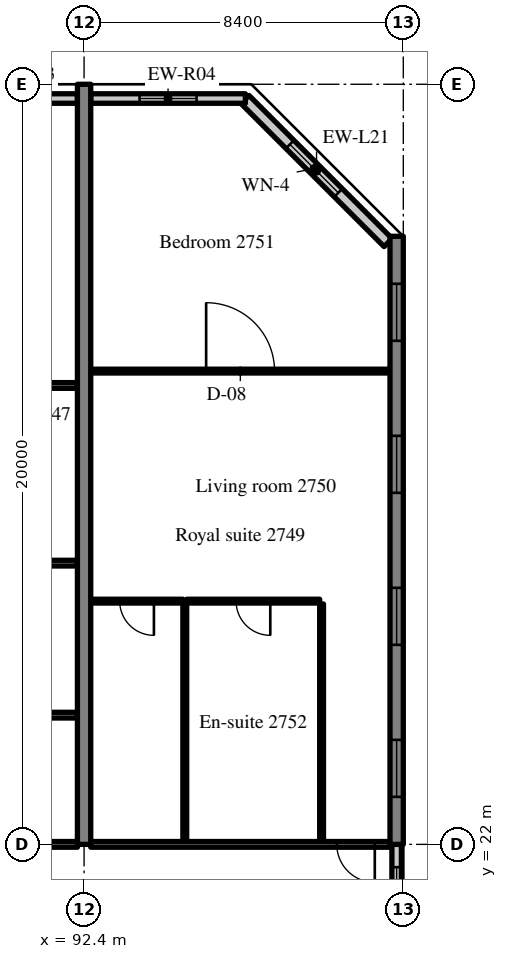
"""IFC4 building model, lengths in metres.
Left out: names, types, materials, properties, quantities, classifications, styles, units other than length and angle.
Written with IfcOpenShell. Run it as: python <this file> out.ifc"""

import sys

from ifc_helpers import new_model, si_unit, direction, frame, frame_2d, origin, place, context, subcontext, project, spatial, rectangle, extrude, source, transform, mapped, element, fill, save


model = new_model("IFC4")
c1 = context("Model", 3, precision=1e-05, world=origin(), true_north=direction((0.0, 1.0)))
c2 = subcontext(c1, "Body", "Model", "MODEL_VIEW")
j1 = project(units=[si_unit("LENGTHUNIT", "METRE"), si_unit("PLANEANGLEUNIT", "RADIAN")], contexts=[c1])
p1 = place(None, origin())
s1 = spatial("IfcSite", under=j1, at=p1, CompositionType="ELEMENT")
p2 = place(p1, origin())
s2 = spatial("IfcBuilding", under=s1, at=p2, CompositionType="ELEMENT")
p3 = place(p2, frame((0.0, 0.0, 114.2)))
s3 = spatial("IfcBuildingStorey", under=s2, at=p3, CompositionType="ELEMENT", Elevation=114.2)
m1 = source(origin(), c2, "Body", "SweptSolid", [
    extrude(rectangle(XDim=20.0, YDim=0.35, at=frame_2d((10.0, 0.0))), origin(), (0.0, 0.0, 1.0), 3.52),
])
p4 = place(p3, frame((92.4, 22.0, 0.0), z_axis=(0.0, 0.0, 1.0), x_axis=(0.0, 1.0, 0.0)))
e1 = element("IfcWall", 1, at=p4, inside=s3, PredefinedType="SHEAR", context=c2, shape_type="MappedRepresentation", body=[
    mapped(m1, transform((0.0, 0.0, 0.0), scale=1.0)),
])
m2 = source(origin(), c2, "Body", "SweptSolid", [
    extrude(rectangle(XDim=16.0, YDim=0.35, at=frame_2d((8.0, 0.0))), origin(), (0.0, 0.0, 1.0), 3.52),
])
p5 = place(p3, frame((100.625, 22.0, 0.0), z_axis=(0.0, 0.0, 1.0), x_axis=(0.0, 1.0, 0.0)))
e2 = element("IfcWall", 2, at=p5, inside=s3, PredefinedType="SHEAR", context=c2, shape_type="MappedRepresentation", body=[
    mapped(m2, transform((0.0, 0.0, 0.0), scale=1.0)),
])
m3 = source(origin(), c2, "Body", "SweptSolid", [
    extrude(rectangle(XDim=1.5, YDim=1.5, at=frame_2d((0.75, 0.75))), frame((0.0, 0.185, 0.0), z_axis=(0.0, -1.0, 0.0), x_axis=(1.0, 0.0, 0.0)), (0.0, 0.0, 1.0), 0.37),
])
p6 = place(p5, frame((1.25, 0.0, 0.9)))
e3 = element("IfcOpeningElement", 3, at=p6, cuts=e2, PredefinedType="OPENING", context=c2, shape_type="MappedRepresentation", body=[
    mapped(m3, transform((0.0, 0.0, 0.0), scale=1.0)),
])
p7 = place(p5, frame((5.25, 0.0, 0.9)))
e4 = element("IfcOpeningElement", 4, at=p7, cuts=e2, PredefinedType="OPENING", context=c2, shape_type="MappedRepresentation", body=[
    mapped(m3, transform((0.0, 0.0, 0.0), scale=1.0)),
])
p8 = place(p5, frame((9.25, 0.0, 0.9)))
e5 = element("IfcOpeningElement", 5, at=p8, cuts=e2, PredefinedType="OPENING", context=c2, shape_type="MappedRepresentation", body=[
    mapped(m3, transform((0.0, 0.0, 0.0), scale=1.0)),
])
p9 = place(p5, frame((13.25, 0.0, 0.9)))
e6 = element("IfcOpeningElement", 6, at=p9, cuts=e2, PredefinedType="OPENING", context=c2, shape_type="MappedRepresentation", body=[
    mapped(m3, transform((0.0, 0.0, 0.0), scale=1.0)),
])
m4 = source(origin(), c2, "Body", "SweptSolid", [
    extrude(rectangle(XDim=5.326, YDim=0.3, at=frame_2d((2.663, 0.0))), origin(), (0.0, 0.0, 1.0), 3.52),
])
p10 = place(p3, frame((100.4, 37.834, 0.0), z_axis=(0.0, 0.0, 1.0), x_axis=(-0.707083859269, 0.707129702361, 0.0)))
e7 = element("IfcWall", 7, at=p10, inside=s3, PredefinedType="SOLIDWALL", context=c2, shape_type="MappedRepresentation", body=[
    mapped(m4, transform((0.0, 0.0, 0.0), scale=1.0)),
])
m5 = source(origin(), c2, "Body", "SweptSolid", [
    extrude(rectangle(XDim=1.8, YDim=1.5, at=frame_2d((0.9, 0.75))), frame((0.0, 0.16, 0.0), z_axis=(0.0, -1.0, 0.0), x_axis=(1.0, 0.0, 0.0)), (0.0, 0.0, 1.0), 0.32),
])
p11 = place(p10, frame((1.854, 0.0, 0.9)))
e8 = element("IfcOpeningElement", 8, at=p11, cuts=e7, PredefinedType="OPENING", context=c2, shape_type="MappedRepresentation", body=[
    mapped(m5, transform((0.0, 0.0, 0.0), scale=1.0)),
])
m6 = source(origin(), c2, "Body", "SweptSolid", [
    extrude(rectangle(XDim=3.675, YDim=0.25, at=frame_2d((1.837, 0.0))), origin(), (0.0, 0.0, 1.0), 2.82),
])
p12 = place(p3, frame((92.225, 41.625, 0.0), z_axis=(0.0, 0.0, 1.0), x_axis=(-1.0, 0.0, 0.0)))
e9 = element("IfcWall", 9, at=p12, inside=s3, PredefinedType="SOLIDWALL", context=c2, shape_type="MappedRepresentation", body=[
    mapped(m6, transform((0.0, 0.0, 0.0), scale=1.0)),
])
m7 = source(origin(), c2, "Body", "SweptSolid", [
    extrude(rectangle(XDim=1.5, YDim=1.5, at=frame_2d((0.75, 0.75))), frame((0.0, 0.135, 0.0), z_axis=(0.0, -1.0, 0.0), x_axis=(1.0, 0.0, 0.0)), (0.0, 0.0, 1.0), 0.27),
])
p13 = place(p12, frame((1.087, 0.0, 0.9)))
e10 = element("IfcOpeningElement", 10, at=p13, cuts=e9, PredefinedType="OPENING", context=c2, shape_type="MappedRepresentation", body=[
    mapped(m7, transform((0.0, 0.0, 0.0), scale=1.0)),
])
m8 = source(origin(), c2, "Body", "SweptSolid", [
    extrude(rectangle(XDim=4.07, YDim=0.25, at=frame_2d((2.035, 0.0))), origin(), (0.0, 0.0, 1.0), 2.82),
])
p14 = place(p3, frame((96.645, 41.625, 0.0), z_axis=(0.0, 0.0, 1.0), x_axis=(-1.0, 0.0, 0.0)))
e11 = element("IfcWall", 11, at=p14, inside=s3, PredefinedType="SOLIDWALL", context=c2, shape_type="MappedRepresentation", body=[
    mapped(m8, transform((0.0, 0.0, 0.0), scale=1.0)),
])
p15 = place(p14, frame((1.285, 0.0, 0.9)))
e12 = element("IfcOpeningElement", 12, at=p15, cuts=e11, PredefinedType="OPENING", context=c2, shape_type="MappedRepresentation", body=[
    mapped(m7, transform((0.0, 0.0, 0.0), scale=1.0)),
])
m9 = source(origin(), c2, "Body", "SweptSolid", [
    extrude(rectangle(XDim=2.4, YDim=0.25, at=frame_2d((1.2, 0.0))), origin(), (0.0, 0.0, 1.0), 2.62),
])
p16 = place(p3, frame((100.625, 19.6, 0.0), z_axis=(0.0, 0.0, 1.0), x_axis=(0.0, 1.0, 0.0)))
e13 = element("IfcWall", 13, at=p16, inside=s3, PredefinedType="SOLIDWALL", context=c2, shape_type="MappedRepresentation", body=[
    mapped(m9, transform((0.0, 0.0, 0.0), scale=1.0)),
])
m10 = source(origin(), c2, "Body", "SweptSolid", [
    extrude(rectangle(XDim=1.2, YDim=1.5, at=frame_2d((0.6, 0.75))), frame((0.0, 0.135, 0.0), z_axis=(0.0, -1.0, 0.0), x_axis=(1.0, 0.0, 0.0)), (0.0, 0.0, 1.0), 0.27),
])
p17 = place(p16, frame((0.6, 0.0, 0.9)))
e14 = element("IfcOpeningElement", 14, at=p17, cuts=e13, PredefinedType="OPENING", context=c2, shape_type="MappedRepresentation", body=[
    mapped(m10, transform((0.0, 0.0, 0.0), scale=1.0)),
])
m11 = source(origin(), c2, "Body", "SweptSolid", [
    extrude(rectangle(XDim=5.5, YDim=0.15, at=frame_2d((2.75, 0.0))), origin(), (0.0, 0.0, 1.0), 2.82),
])
p18 = place(p3, frame((86.725, 22.0, 0.0), z_axis=(0.0, 0.0, 1.0), x_axis=(1.0, 0.0, 0.0)))
e15 = element("IfcWall", 15, at=p18, inside=s3, PredefinedType="PARTITIONING", context=c2, shape_type="MappedRepresentation", body=[
    mapped(m11, transform((0.0, 0.0, 0.0), scale=1.0)),
])
m12 = source(origin(), c2, "Body", "SweptSolid", [
    extrude(rectangle(XDim=5.5, YDim=0.15, at=frame_2d((2.75, 0.0))), origin(), (0.0, 0.0, 1.0), 3.52),
])
for number, where, z_axis, x_axis in (
    (16, (86.725, 25.4, 0.0), (0.0, 0.0, 1.0), (1.0, 0.0, 0.0)),
    (17, (86.725, 29.4, 0.0), (0.0, 0.0, 1.0), (1.0, 0.0, 0.0)),
):
    element("IfcWall", number, at=place(p3, frame(where, z_axis=z_axis, x_axis=x_axis)), inside=s3, PredefinedType="PARTITIONING", context=c2, shape_type="MappedRepresentation", body=[
        mapped(m12, transform((0.0, 0.0, 0.0), scale=1.0)),
    ])
m13 = source(origin(), c2, "Body", "SweptSolid", [
    extrude(rectangle(XDim=8.05, YDim=0.15, at=frame_2d((4.025, 0.0))), origin(), (0.0, 0.0, 1.0), 3.52),
])
p19 = place(p3, frame((84.175, 34.075, 0.0), z_axis=(0.0, 0.0, 1.0), x_axis=(1.0, 0.0, 0.0)))
e18 = element("IfcWall", 18, at=p19, inside=s3, PredefinedType="PARTITIONING", context=c2, shape_type="MappedRepresentation", body=[
    mapped(m13, transform((0.0, 0.0, 0.0), scale=1.0)),
])
m14 = source(origin(), c2, "Body", "SweptSolid", [
    extrude(rectangle(XDim=1.0, YDim=2.1, at=frame_2d((0.5, 1.05))), frame((0.0, 0.085, 0.0), z_axis=(0.0, -1.0, 0.0), x_axis=(1.0, 0.0, 0.0)), (0.0, 0.0, 1.0), 0.17),
])
p20 = place(p19, frame((0.7, 0.0, 0.0)))
e19 = element("IfcOpeningElement", 19, at=p20, cuts=e18, PredefinedType="OPENING", context=c2, shape_type="MappedRepresentation", body=[
    mapped(m14, transform((0.0, 0.0, 0.0), scale=1.0)),
])
m15 = source(origin(), c2, "Body", "SweptSolid", [
    extrude(rectangle(XDim=6.25, YDim=0.1, at=frame_2d((3.125, 0.0))), origin(), (0.0, 0.0, 1.0), 3.52),
])
for number, where, z_axis, x_axis in (
    (20, (98.65, 22.075, 0.0), (0.0, 0.0, 1.0), (0.0, 1.0, 0.0)),
    (21, (95.05, 22.075, 0.0), (0.0, 0.0, 1.0), (0.0, 1.0, 0.0)),
):
    element("IfcWall", number, at=place(p3, frame(where, z_axis=z_axis, x_axis=x_axis)), inside=s3, PredefinedType="PARTITIONING", context=c2, shape_type="MappedRepresentation", body=[
        mapped(m15, transform((0.0, 0.0, 0.0), scale=1.0)),
    ])
m16 = source(origin(), c2, "Body", "SweptSolid", [
    extrude(rectangle(XDim=3.5, YDim=0.1, at=frame_2d((1.75, 0.0))), origin(), (0.0, 0.0, 1.0), 3.52),
])
p21 = place(p3, frame((95.1, 28.4, 0.0), z_axis=(0.0, 0.0, 1.0), x_axis=(1.0, 0.0, 0.0)))
e22 = element("IfcWall", 22, at=p21, inside=s3, PredefinedType="PARTITIONING", context=c2, shape_type="MappedRepresentation", body=[
    mapped(m16, transform((0.0, 0.0, 0.0), scale=1.0)),
])
m17 = source(origin(), c2, "Body", "SweptSolid", [
    extrude(rectangle(XDim=0.9, YDim=2.1, at=frame_2d((0.45, 1.05))), frame((0.0, 0.06, 0.0), z_axis=(0.0, -1.0, 0.0), x_axis=(1.0, 0.0, 0.0)), (0.0, 0.0, 1.0), 0.12),
])
p22 = place(p21, frame((1.3, 0.0, 0.0)))
e23 = element("IfcOpeningElement", 23, at=p22, cuts=e22, PredefinedType="OPENING", context=c2, shape_type="MappedRepresentation", body=[
    mapped(m17, transform((0.0, 0.0, 0.0), scale=1.0)),
])
m18 = source(origin(), c2, "Body", "SweptSolid", [
    extrude(rectangle(XDim=2.425, YDim=0.1, at=frame_2d((1.212, 0.0))), origin(), (0.0, 0.0, 1.0), 3.52),
])
p23 = place(p3, frame((92.575, 28.4, 0.0), z_axis=(0.0, 0.0, 1.0), x_axis=(1.0, 0.0, 0.0)))
e24 = element("IfcWall", 24, at=p23, inside=s3, PredefinedType="PARTITIONING", context=c2, shape_type="MappedRepresentation", body=[
    mapped(m18, transform((0.0, 0.0, 0.0), scale=1.0)),
])
p24 = place(p23, frame((0.763, 0.0, 0.0)))
e25 = element("IfcOpeningElement", 25, at=p24, cuts=e24, PredefinedType="OPENING", context=c2, shape_type="MappedRepresentation", body=[
    mapped(m17, transform((0.0, 0.0, 0.0), scale=1.0)),
])
m19 = source(origin(), c2, "Body", "SweptSolid", [
    extrude(rectangle(XDim=7.875, YDim=0.1, at=frame_2d((3.938, 0.0))), origin(), (0.0, 0.0, 1.0), 3.52),
])
p25 = place(p3, frame((92.575, 34.453, 0.0), z_axis=(0.0, 0.0, 1.0), x_axis=(1.0, 0.0, 0.0)))
e26 = element("IfcWall", 26, at=p25, inside=s3, PredefinedType="PARTITIONING", context=c2, shape_type="MappedRepresentation", body=[
    mapped(m19, transform((0.0, 0.0, 0.0), scale=1.0)),
])
m20 = source(origin(), c2, "Body", "SweptSolid", [
    extrude(rectangle(XDim=1.8, YDim=2.1, at=frame_2d((0.9, 1.05))), frame((0.0, 0.06, 0.0), z_axis=(0.0, -1.0, 0.0), x_axis=(1.0, 0.0, 0.0)), (0.0, 0.0, 1.0), 0.12),
])
p26 = place(p25, frame((3.037, 0.0, 0.0)))
e27 = element("IfcOpeningElement", 27, at=p26, cuts=e26, PredefinedType="OPENING", context=c2, shape_type="MappedRepresentation", body=[
    mapped(m20, transform((0.0, 0.0, 0.0), scale=1.0)),
])
m21 = source(origin(), c2, "Body", "SweptSolid", [
    extrude(rectangle(XDim=7.875, YDim=0.15, at=frame_2d((3.938, 0.0))), origin(), (0.0, 0.0, 1.0), 2.82),
])
p27 = place(p3, frame((92.575, 22.0, 0.0), z_axis=(0.0, 0.0, 1.0), x_axis=(1.0, 0.0, 0.0)))
e28 = element("IfcWall", 28, at=p27, inside=s3, PredefinedType="PARTITIONING", context=c2, shape_type="MappedRepresentation", body=[
    mapped(m21, transform((0.0, 0.0, 0.0), scale=1.0)),
])
p28 = place(p27, frame((6.475, 0.0, 0.0)))
e29 = element("IfcOpeningElement", 29, at=p28, cuts=e28, PredefinedType="OPENING", context=c2, shape_type="MappedRepresentation", body=[
    mapped(m14, transform((0.0, 0.0, 0.0), scale=1.0)),
])
m22 = source(origin(), c2, "Body", "SweptSolid", [
    extrude(rectangle(XDim=1.8, YDim=1.5, at=frame_2d((0.9, 0.75))), frame((0.0, 0.03, 0.0), z_axis=(0.0, -1.0, 0.0), x_axis=(1.0, 0.0, 0.0)), (0.0, 0.0, 1.0), 0.06),
])
p29 = place(p11, origin())
e30 = element("IfcWindow", 30, at=p29, inside=s3, PartitioningType="SINGLE_PANEL", PredefinedType="WINDOW", context=c2, shape_type="MappedRepresentation", body=[
    mapped(m22, transform((0.0, 0.0, 0.0), scale=1.0)),
])
fill(e8, e30)
m23 = source(origin(), c2, "Body", "SweptSolid", [
    extrude(rectangle(XDim=1.5, YDim=1.5, at=frame_2d((0.75, 0.75))), frame((0.0, 0.03, 0.0), z_axis=(0.0, -1.0, 0.0), x_axis=(1.0, 0.0, 0.0)), (0.0, 0.0, 1.0), 0.06),
])
p30 = place(p15, origin())
e31 = element("IfcWindow", 31, at=p30, inside=s3, PartitioningType="SINGLE_PANEL", PredefinedType="WINDOW", context=c2, shape_type="MappedRepresentation", body=[
    mapped(m23, transform((0.0, 0.0, 0.0), scale=1.0)),
])
fill(e12, e31)
p31 = place(p6, origin())
e32 = element("IfcWindow", 32, at=p31, inside=s3, PartitioningType="SINGLE_PANEL", PredefinedType="WINDOW", context=c2, shape_type="MappedRepresentation", body=[
    mapped(m23, transform((0.0, 0.0, 0.0), scale=1.0)),
])
fill(e3, e32)
p32 = place(p7, origin())
e33 = element("IfcWindow", 33, at=p32, inside=s3, PartitioningType="SINGLE_PANEL", PredefinedType="WINDOW", context=c2, shape_type="MappedRepresentation", body=[
    mapped(m23, transform((0.0, 0.0, 0.0), scale=1.0)),
])
fill(e4, e33)
p33 = place(p8, origin())
e34 = element("IfcWindow", 34, at=p33, inside=s3, PartitioningType="SINGLE_PANEL", PredefinedType="WINDOW", context=c2, shape_type="MappedRepresentation", body=[
    mapped(m23, transform((0.0, 0.0, 0.0), scale=1.0)),
])
fill(e5, e34)
p34 = place(p9, origin())
e35 = element("IfcWindow", 35, at=p34, inside=s3, PartitioningType="SINGLE_PANEL", PredefinedType="WINDOW", context=c2, shape_type="MappedRepresentation", body=[
    mapped(m23, transform((0.0, 0.0, 0.0), scale=1.0)),
])
fill(e6, e35)
m24 = source(origin(), c2, "Body", "SweptSolid", [
    extrude(rectangle(XDim=1.2, YDim=1.5, at=frame_2d((0.6, 0.75))), frame((0.0, 0.03, 0.0), z_axis=(0.0, -1.0, 0.0), x_axis=(1.0, 0.0, 0.0)), (0.0, 0.0, 1.0), 0.06),
])
p35 = place(p17, origin())
e36 = element("IfcWindow", 36, at=p35, inside=s3, PartitioningType="SINGLE_PANEL", PredefinedType="WINDOW", context=c2, shape_type="MappedRepresentation", body=[
    mapped(m24, transform((0.0, 0.0, 0.0), scale=1.0)),
])
fill(e14, e36)
m25 = source(origin(), c2, "Body", "SweptSolid", [
    extrude(rectangle(XDim=0.9, YDim=2.1, at=frame_2d((0.45, 1.05))), frame((0.0, 0.025, 0.0), z_axis=(0.0, -1.0, 0.0), x_axis=(1.0, 0.0, 0.0)), (0.0, 0.0, 1.0), 0.05),
])
p36 = place(p22, origin())
e37 = element("IfcDoor", 37, at=p36, inside=s3, OperationType="SINGLE_SWING_RIGHT", PredefinedType="DOOR", context=c2, shape_type="MappedRepresentation", body=[
    mapped(m25, transform((0.0, 0.0, 0.0), scale=1.0)),
])
fill(e23, e37)
p37 = place(p24, origin())
e38 = element("IfcDoor", 38, at=p37, inside=s3, OperationType="SINGLE_SWING_RIGHT", PredefinedType="DOOR", context=c2, shape_type="MappedRepresentation", body=[
    mapped(m25, transform((0.0, 0.0, 0.0), scale=1.0)),
])
fill(e25, e38)
m26 = source(origin(), c2, "Body", "SweptSolid", [
    extrude(rectangle(XDim=1.8, YDim=2.1, at=frame_2d((0.9, 1.05))), frame((0.0, 0.025, 0.0), z_axis=(0.0, -1.0, 0.0), x_axis=(1.0, 0.0, 0.0)), (0.0, 0.0, 1.0), 0.05),
])
p38 = place(p26, origin())
e39 = element("IfcDoor", 39, at=p38, inside=s3, OperationType="DOUBLE_DOOR_SINGLE_SWING", PredefinedType="DOOR", context=c2, shape_type="MappedRepresentation", body=[
    mapped(m26, transform((0.0, 0.0, 0.0), scale=1.0)),
])
fill(e27, e39)
m27 = source(origin(), c2, "Body", "SweptSolid", [
    extrude(rectangle(XDim=1.0, YDim=2.1, at=frame_2d((0.5, 1.05))), frame((0.0, 0.025, 0.0), z_axis=(0.0, -1.0, 0.0), x_axis=(1.0, 0.0, 0.0)), (0.0, 0.0, 1.0), 0.05),
])
p39 = place(p28, origin())
e40 = element("IfcDoor", 40, at=p39, inside=s3, OperationType="SINGLE_SWING_RIGHT", PredefinedType="DOOR", context=c2, shape_type="MappedRepresentation", body=[
    mapped(m27, transform((0.0, 0.0, 0.0), scale=1.0)),
])
fill(e29, e40)
save(model, sys.argv[1])
